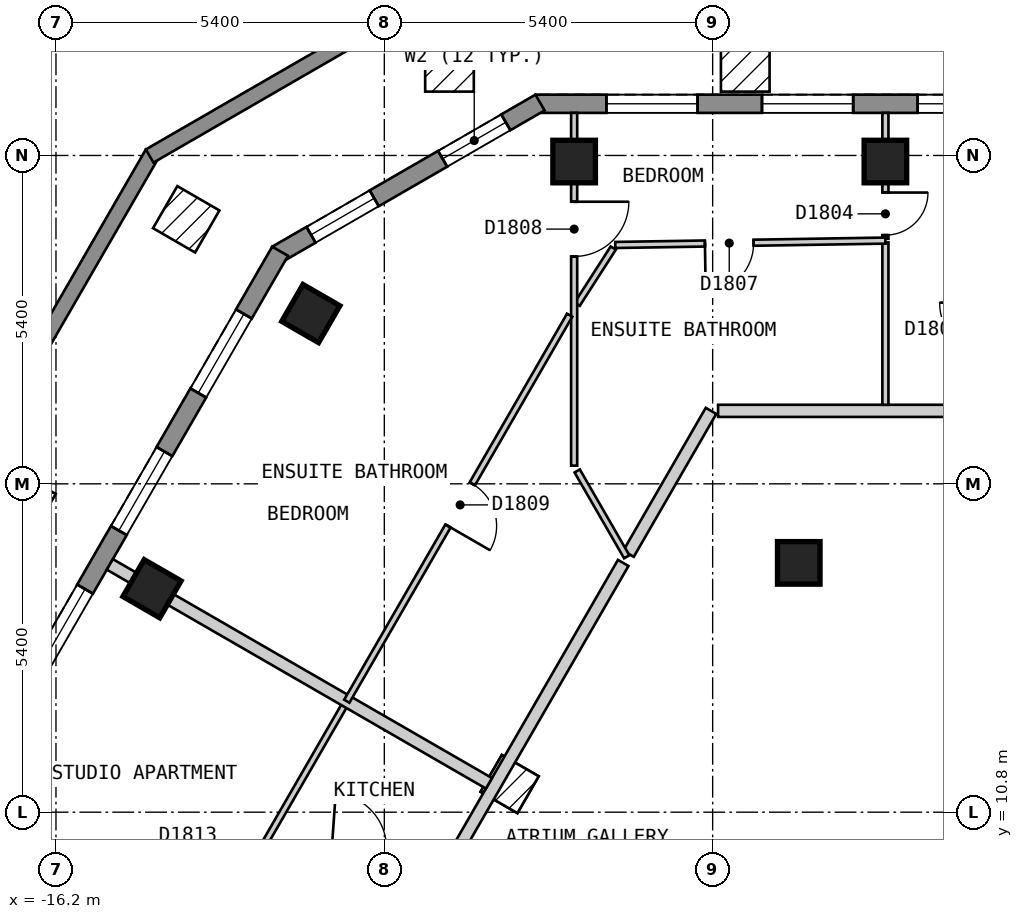
"""IFC4 building model, lengths in metres.
Left out: names, types, materials, properties, quantities, classifications, styles, units other than length and angle.
Written with IfcOpenShell. Run it as: python <this file> out.ifc"""

import sys

from ifc_helpers import new_model, si_unit, direction, frame, frame_2d, origin, origin_2d, place, context, subcontext, project, spatial, polyline, rectangle, outline, extrude, element, fill, save


model = new_model("IFC4")
c1 = context("Model", 3, precision=1e-05, world=origin(), true_north=direction((0.0, 1.0)))
c2 = subcontext(c1, "Body", "Model", "MODEL_VIEW")
j1 = project(units=[si_unit("LENGTHUNIT", "METRE"), si_unit("PLANEANGLEUNIT", "RADIAN")], contexts=[c1])
p1 = place(None, origin())
s1 = spatial("IfcSite", under=j1, at=p1, CompositionType="ELEMENT")
p2 = place(p1, origin())
s2 = spatial("IfcBuilding", under=s1, at=p2, CompositionType="ELEMENT")
p3 = place(p2, frame((0.0, 0.0, 202.8)))
s3 = spatial("IfcBuildingStorey", under=s2, at=p3, CompositionType="ELEMENT", Elevation=202.8)
for number, where, z_axis, x_axis in (
    (1, (-2.559, 21.5, 0.0), (0.0, 0.0, 1.0), (-1.0, 0.0, 0.0)),
    (2, (-7.678, 21.5, 0.0), (0.0, 0.0, 1.0), (-1.0, 0.0, 0.0)),
    (3, (-12.009, 19.0, 0.0), (0.0, 0.0, 1.0), (-0.5, -0.866, 0.0)),
    (4, (-14.621, 14.475, 0.0), (0.0, 0.0, 1.0), (-0.5, -0.866, 0.0)),
    (5, (-3.984, 14.9, 0.0), (0.0, 0.0, 1.0), (1.0, 0.0, 0.0)),
):
    element("IfcColumn", number, at=place(p3, frame(where, z_axis=z_axis, x_axis=x_axis)), inside=s3, PredefinedType="COLUMN", context=c2, shape_type="SweptSolid", body=[
        extrude(rectangle(XDim=0.7, YDim=0.7, at=origin_2d()), origin(), (0.0, 0.0, 1.0), 3.0),
    ])
p4 = place(p3, frame((8.314, 22.45, 0.0), z_axis=(0.0, 0.0, 1.0), x_axis=(-1.0, 0.0, 0.0)))
e6 = element("IfcWall", 6, at=p4, inside=s3, PredefinedType="SOLIDWALL", context=c2, shape_type="SweptSolid", body=[
    extrude(outline(polyline([(0.0, -0.15), (16.628, -0.15), (16.548, 0.15), (0.08, 0.15), (0.0, -0.15)])), origin(), (0.0, 0.0, 1.0), 2.7),
])
p5 = place(p4, frame((1.165, 0.0, 0.15)))
e7 = element("IfcOpeningElement", 7, at=p5, cuts=e6, PredefinedType="OPENING", context=c2, shape_type="SweptSolid", body=[
    extrude(rectangle(XDim=1.5, YDim=2.1, at=frame_2d((0.75, 1.05))), frame((0.0, 0.16, 0.0), z_axis=(0.0, -1.0, 0.0), x_axis=(1.0, 0.0, 0.0)), (0.0, 0.0, 1.0), 0.32),
])
p6 = place(p4, frame((3.724, 0.0, 0.15)))
e8 = element("IfcOpeningElement", 8, at=p6, cuts=e6, PredefinedType="OPENING", context=c2, shape_type="SweptSolid", body=[
    extrude(rectangle(XDim=1.5, YDim=2.1, at=frame_2d((0.75, 1.05))), frame((0.0, 0.16, 0.0), z_axis=(0.0, -1.0, 0.0), x_axis=(1.0, 0.0, 0.0)), (0.0, 0.0, 1.0), 0.32),
])
p7 = place(p4, frame((6.284, 0.0, 0.15)))
e9 = element("IfcOpeningElement", 9, at=p7, cuts=e6, PredefinedType="OPENING", context=c2, shape_type="SweptSolid", body=[
    extrude(rectangle(XDim=1.5, YDim=2.1, at=frame_2d((0.75, 1.05))), frame((0.0, 0.16, 0.0), z_axis=(0.0, -1.0, 0.0), x_axis=(1.0, 0.0, 0.0)), (0.0, 0.0, 1.0), 0.32),
])
p8 = place(p4, frame((8.843, 0.0, 0.15)))
e10 = element("IfcOpeningElement", 10, at=p8, cuts=e6, PredefinedType="OPENING", context=c2, shape_type="SweptSolid", body=[
    extrude(rectangle(XDim=1.5, YDim=2.1, at=frame_2d((0.75, 1.05))), frame((0.0, 0.16, 0.0), z_axis=(0.0, -1.0, 0.0), x_axis=(1.0, 0.0, 0.0)), (0.0, 0.0, 1.0), 0.32),
])
p9 = place(p4, frame((11.403, 0.0, 0.15)))
e11 = element("IfcOpeningElement", 11, at=p9, cuts=e6, PredefinedType="OPENING", context=c2, shape_type="SweptSolid", body=[
    extrude(rectangle(XDim=1.5, YDim=2.1, at=frame_2d((0.75, 1.05))), frame((0.0, 0.16, 0.0), z_axis=(0.0, -1.0, 0.0), x_axis=(1.0, 0.0, 0.0)), (0.0, 0.0, 1.0), 0.32),
])
p10 = place(p4, frame((13.962, 0.0, 0.15)))
e12 = element("IfcOpeningElement", 12, at=p10, cuts=e6, PredefinedType="OPENING", context=c2, shape_type="SweptSolid", body=[
    extrude(rectangle(XDim=1.5, YDim=2.1, at=frame_2d((0.75, 1.05))), frame((0.0, 0.16, 0.0), z_axis=(0.0, -1.0, 0.0), x_axis=(1.0, 0.0, 0.0)), (0.0, 0.0, 1.0), 0.32),
])
p11 = place(p3, frame((-8.239, 22.47, 0.0), z_axis=(0.0, 0.0, 1.0), x_axis=(-0.866022959057, -0.500004234368, 0.0)))
e13 = element("IfcWall", 13, at=p11, inside=s3, PredefinedType="SOLIDWALL", context=c2, shape_type="SweptSolid", body=[
    extrude(outline(polyline([(0.0, -0.15), (5.0, -0.15), (4.92, 0.15), (0.08, 0.15), (0.0, -0.15)])), origin(), (0.0, 0.0, 1.0), 2.7),
])
p12 = place(p11, frame((0.65, 0.0, 0.15)))
e14 = element("IfcOpeningElement", 14, at=p12, cuts=e13, PredefinedType="OPENING", context=c2, shape_type="SweptSolid", body=[
    extrude(rectangle(XDim=1.2, YDim=2.1, at=frame_2d((0.6, 1.05))), frame((0.0, 0.16, 0.0), z_axis=(0.0, -1.0, 0.0), x_axis=(1.0, 0.0, 0.0)), (0.0, 0.0, 1.0), 0.32),
])
p13 = place(p11, frame((3.149, 0.0, 0.15)))
e15 = element("IfcOpeningElement", 15, at=p13, cuts=e13, PredefinedType="OPENING", context=c2, shape_type="SweptSolid", body=[
    extrude(rectangle(XDim=1.2, YDim=2.1, at=frame_2d((0.6, 1.05))), frame((0.0, 0.16, 0.0), z_axis=(0.0, -1.0, 0.0), x_axis=(1.0, 0.0, 0.0)), (0.0, 0.0, 1.0), 0.32),
])
p14 = place(p3, frame((-12.514, 20.025, 0.0), z_axis=(0.0, 0.0, 1.0), x_axis=(-0.500003656944, -0.866023292436, 0.0)))
e16 = element("IfcWall", 16, at=p14, inside=s3, PredefinedType="SOLIDWALL", context=c2, shape_type="SweptSolid", body=[
    extrude(outline(polyline([(0.0, -0.15), (22.17, -0.15), (22.09, 0.15), (0.08, 0.15), (0.0, -0.15)])), origin(), (0.0, 0.0, 1.0), 2.7),
])
p15 = place(p14, frame((1.191, 0.0, 0.15)))
e17 = element("IfcOpeningElement", 17, at=p15, cuts=e16, PredefinedType="OPENING", context=c2, shape_type="SweptSolid", body=[
    extrude(rectangle(XDim=1.5, YDim=2.1, at=frame_2d((0.75, 1.05))), frame((0.0, 0.16, 0.0), z_axis=(0.0, -1.0, 0.0), x_axis=(1.0, 0.0, 0.0)), (0.0, 0.0, 1.0), 0.32),
])
p16 = place(p14, frame((3.804, 0.0, 0.15)))
e18 = element("IfcOpeningElement", 18, at=p16, cuts=e16, PredefinedType="OPENING", context=c2, shape_type="SweptSolid", body=[
    extrude(rectangle(XDim=1.5, YDim=2.1, at=frame_2d((0.75, 1.05))), frame((0.0, 0.16, 0.0), z_axis=(0.0, -1.0, 0.0), x_axis=(1.0, 0.0, 0.0)), (0.0, 0.0, 1.0), 0.32),
])
p17 = place(p14, frame((6.416, 0.0, 0.15)))
e19 = element("IfcOpeningElement", 19, at=p17, cuts=e16, PredefinedType="OPENING", context=c2, shape_type="SweptSolid", body=[
    extrude(rectangle(XDim=1.5, YDim=2.1, at=frame_2d((0.75, 1.05))), frame((0.0, 0.16, 0.0), z_axis=(0.0, -1.0, 0.0), x_axis=(1.0, 0.0, 0.0)), (0.0, 0.0, 1.0), 0.32),
])
p18 = place(p14, frame((9.029, 0.0, 0.15)))
e20 = element("IfcOpeningElement", 20, at=p18, cuts=e16, PredefinedType="OPENING", context=c2, shape_type="SweptSolid", body=[
    extrude(rectangle(XDim=1.5, YDim=2.1, at=frame_2d((0.75, 1.05))), frame((0.0, 0.16, 0.0), z_axis=(0.0, -1.0, 0.0), x_axis=(1.0, 0.0, 0.0)), (0.0, 0.0, 1.0), 0.32),
])
p19 = place(p14, frame((11.641, 0.0, 0.15)))
e21 = element("IfcOpeningElement", 21, at=p19, cuts=e16, PredefinedType="OPENING", context=c2, shape_type="SweptSolid", body=[
    extrude(rectangle(XDim=1.5, YDim=2.1, at=frame_2d((0.75, 1.05))), frame((0.0, 0.16, 0.0), z_axis=(0.0, -1.0, 0.0), x_axis=(1.0, 0.0, 0.0)), (0.0, 0.0, 1.0), 0.32),
])
p20 = place(p14, frame((14.254, 0.0, 0.15)))
e22 = element("IfcOpeningElement", 22, at=p20, cuts=e16, PredefinedType="OPENING", context=c2, shape_type="SweptSolid", body=[
    extrude(rectangle(XDim=1.5, YDim=2.1, at=frame_2d((0.75, 1.05))), frame((0.0, 0.16, 0.0), z_axis=(0.0, -1.0, 0.0), x_axis=(1.0, 0.0, 0.0)), (0.0, 0.0, 1.0), 0.32),
])
p21 = place(p14, frame((16.866, 0.0, 0.15)))
e23 = element("IfcOpeningElement", 23, at=p21, cuts=e16, PredefinedType="OPENING", context=c2, shape_type="SweptSolid", body=[
    extrude(rectangle(XDim=1.5, YDim=2.1, at=frame_2d((0.75, 1.05))), frame((0.0, 0.16, 0.0), z_axis=(0.0, -1.0, 0.0), x_axis=(1.0, 0.0, 0.0)), (0.0, 0.0, 1.0), 0.32),
])
p22 = place(p14, frame((19.479, 0.0, 0.15)))
e24 = element("IfcOpeningElement", 24, at=p22, cuts=e16, PredefinedType="OPENING", context=c2, shape_type="SweptSolid", body=[
    extrude(rectangle(XDim=1.5, YDim=2.1, at=frame_2d((0.75, 1.05))), frame((0.0, 0.16, 0.0), z_axis=(0.0, -1.0, 0.0), x_axis=(1.0, 0.0, 0.0)), (0.0, 0.0, 1.0), 0.32),
])
p23 = place(p3, frame((-26.046, 1.838, 0.0), z_axis=(0.0, 0.0, 1.0), x_axis=(0.500061067893, 0.865990143349, 0.0)))
e25 = element("IfcWall", 25, at=p23, inside=s3, PredefinedType="PARAPET", context=c2, shape_type="SweptSolid", body=[
    extrude(outline(polyline([(0.067, -0.125), (22.796, -0.125), (22.863, 0.125), (0.0, 0.125), (0.067, -0.125)])), origin(), (0.0, 0.0, 1.0), 1.6),
])
p24 = place(p3, frame((-14.659, 21.591, 0.0), z_axis=(0.0, 0.0, 1.0), x_axis=(0.865877295069, 0.50025644412, 0.0)))
e26 = element("IfcWall", 26, at=p24, inside=s3, PredefinedType="PARAPET", context=c2, shape_type="SweptSolid", body=[
    extrude(outline(polyline([(0.067, -0.125), (4.932, -0.125), (4.999, 0.125), (0.0, 0.125), (0.067, -0.125)])), origin(), (0.0, 0.0, 1.0), 1.6),
])
p25 = place(p3, frame((-5.311, 17.4, 0.0), z_axis=(0.0, 0.0, 1.0), x_axis=(1.0, 0.0, 0.0)))
e27 = element("IfcWall", 27, at=p25, inside=s3, PredefinedType="PARTITIONING", context=c2, shape_type="SweptSolid", body=[
    extrude(rectangle(XDim=10.737, YDim=0.2, at=frame_2d((5.369, 0.0))), origin(), (0.0, 0.0, 1.0), 2.7),
])
p26 = place(p25, frame((4.812, 0.0, 0.0)))
e28 = element("IfcOpeningElement", 28, at=p26, cuts=e27, PredefinedType="OPENING", context=c2, shape_type="SweptSolid", body=[
    extrude(rectangle(XDim=1.0, YDim=2.1, at=frame_2d((0.5, 1.05))), frame((0.0, 0.11, 0.0), z_axis=(0.0, -1.0, 0.0), x_axis=(1.0, 0.0, 0.0)), (0.0, 0.0, 1.0), 0.22),
])
p27 = place(p3, frame((-10.826, 8.048, 0.0), z_axis=(0.0, 0.0, 1.0), x_axis=(0.499953104851, 0.866052477019, 0.0)))
e29 = element("IfcWall", 29, at=p27, inside=s3, PredefinedType="PARTITIONING", context=c2, shape_type="SweptSolid", body=[
    extrude(rectangle(XDim=7.91, YDim=0.2, at=frame_2d((3.955, 0.0))), origin(), (0.0, 0.0, 1.0), 2.7),
])
p28 = place(p27, frame((0.603, 0.0, 0.0)))
e30 = element("IfcOpeningElement", 30, at=p28, cuts=e29, PredefinedType="OPENING", context=c2, shape_type="SweptSolid", body=[
    extrude(rectangle(XDim=1.0, YDim=2.1, at=frame_2d((0.5, 1.05))), frame((0.0, 0.11, 0.0), z_axis=(0.0, -1.0, 0.0), x_axis=(1.0, 0.0, 0.0)), (0.0, 0.0, 1.0), 0.22),
])
p29 = place(p3, frame((-6.784, 15.05, 0.0), z_axis=(0.0, 0.0, 1.0), x_axis=(0.500067724834, 0.865986299303, 0.0)))
e31 = element("IfcWall", 31, at=p29, inside=s3, PredefinedType="PARTITIONING", context=c2, shape_type="SweptSolid", body=[
    extrude(rectangle(XDim=2.713, YDim=0.2, at=frame_2d((1.357, 0.0))), origin(), (0.0, 0.0, 1.0), 2.7),
])
p30 = place(p3, frame((-7.628, 16.412, 0.0), z_axis=(0.0, 0.0, 1.0), x_axis=(0.499843439945, -0.866115774908, 0.0)))
e32 = element("IfcWall", 32, at=p30, inside=s3, PredefinedType="PARTITIONING", context=c2, shape_type="SweptSolid", body=[
    extrude(rectangle(XDim=1.63, YDim=0.1, at=frame_2d((0.815, 0.0))), origin(), (0.0, 0.0, 1.0), 2.7),
])
p31 = place(p3, frame((-2.559, 20.17, 0.0), z_axis=(0.0, 0.0, 1.0), x_axis=(0.0, -1.0, 0.0)))
e33 = element("IfcWall", 33, at=p31, inside=s3, PredefinedType="PARTITIONING", context=c2, shape_type="SweptSolid", body=[
    extrude(rectangle(XDim=2.67, YDim=0.1, at=frame_2d((1.335, 0.0))), origin(), (0.0, 0.0, 1.0), 2.7),
])
p32 = place(p3, frame((-7.628, 19.154, 0.0), z_axis=(0.0, 0.0, 1.0), x_axis=(0.540600102017, 0.841279697663, 0.0)))
e34 = element("IfcWall", 34, at=p32, inside=s3, PredefinedType="PARTITIONING", context=c2, shape_type="SweptSolid", body=[
    extrude(rectangle(XDim=1.097, YDim=0.1, at=frame_2d((0.548, 0.0))), origin(), (0.0, 0.0, 1.0), 2.7),
])
p33 = place(p3, frame((-12.778, 10.268, 0.0), z_axis=(0.0, 0.0, 1.0), x_axis=(0.500084799062, 0.865976439487, 0.0)))
e35 = element("IfcWall", 35, at=p33, inside=s3, PredefinedType="PARTITIONING", context=c2, shape_type="SweptSolid", body=[
    extrude(rectangle(XDim=2.722, YDim=0.1, at=frame_2d((1.361, 0.0))), origin(), (0.0, 0.0, 1.0), 2.7),
])
p34 = place(p3, frame((-7.678, 16.499, 0.0), z_axis=(0.0, 0.0, 1.0), x_axis=(0.0, 1.0, 0.0)))
e36 = element("IfcWall", 36, at=p34, inside=s3, PredefinedType="PARTITIONING", context=c2, shape_type="SweptSolid", body=[
    extrude(rectangle(XDim=5.801, YDim=0.1, at=frame_2d((2.9, 0.0))), origin(), (0.0, 0.0, 1.0), 2.7),
])
p35 = place(p34, frame((3.44, 0.0, 0.0)))
e37 = element("IfcOpeningElement", 37, at=p35, cuts=e36, PredefinedType="OPENING", context=c2, shape_type="SweptSolid", body=[
    extrude(rectangle(XDim=0.9, YDim=2.1, at=frame_2d((0.45, 1.05))), frame((0.0, 0.06, 0.0), z_axis=(0.0, -1.0, 0.0), x_axis=(1.0, 0.0, 0.0)), (0.0, 0.0, 1.0), 0.12),
])
p36 = place(p3, frame((-2.559, 20.23, 0.0), z_axis=(0.0, 0.0, 1.0), x_axis=(0.0, 1.0, 0.0)))
e38 = element("IfcWall", 38, at=p36, inside=s3, PredefinedType="PARTITIONING", context=c2, shape_type="SweptSolid", body=[
    extrude(rectangle(XDim=2.07, YDim=0.1, at=frame_2d((1.035, 0.0))), origin(), (0.0, 0.0, 1.0), 2.7),
])
p37 = place(p36, frame((0.06, 0.0, 0.0)))
e39 = element("IfcOpeningElement", 39, at=p37, cuts=e38, PredefinedType="OPENING", context=c2, shape_type="SweptSolid", body=[
    extrude(rectangle(XDim=0.7, YDim=2.1, at=frame_2d((0.35, 1.05))), frame((0.0, 0.06, 0.0), z_axis=(0.0, -1.0, 0.0), x_axis=(1.0, 0.0, 0.0)), (0.0, 0.0, 1.0), 0.12),
])
p38 = place(p3, frame((-7.002, 20.128, 0.0), z_axis=(0.0, 0.0, 1.0), x_axis=(0.999868634558, 0.016208443081, 0.0)))
e40 = element("IfcWall", 40, at=p38, inside=s3, PredefinedType="PARTITIONING", context=c2, shape_type="SweptSolid", body=[
    extrude(rectangle(XDim=4.443, YDim=0.1, at=frame_2d((2.222, 0.0))), origin(), (0.0, 0.0, 1.0), 2.7),
])
p39 = place(p38, frame((1.475, 0.0, 0.0)))
e41 = element("IfcOpeningElement", 41, at=p39, cuts=e40, PredefinedType="OPENING", context=c2, shape_type="SweptSolid", body=[
    extrude(rectangle(XDim=0.8, YDim=2.1, at=frame_2d((0.4, 1.05))), frame((0.0, 0.06, 0.0), z_axis=(0.0, -1.0, 0.0), x_axis=(1.0, 0.0, 0.0)), (0.0, 0.0, 1.0), 0.12),
])
p40 = place(p3, frame((-17.926, 10.35, 0.0), z_axis=(0.0, 0.0, 1.0), x_axis=(0.866018411306, -0.500012111133, 0.0)))
e42 = element("IfcWall", 42, at=p40, inside=s3, PredefinedType="PARTITIONING", context=c2, shape_type="SweptSolid", body=[
    extrude(rectangle(XDim=9.898, YDim=0.2, at=frame_2d((4.949, 0.0))), origin(), (0.0, 0.0, 1.0), 2.7),
])
p41 = place(p3, frame((-15.314, 14.875, 0.0), z_axis=(0.0, 0.0, 1.0), x_axis=(0.866001485781, -0.500041424909, 0.0)))
e43 = element("IfcWall", 43, at=p41, inside=s3, PredefinedType="PARTITIONING", context=c2, shape_type="SweptSolid", body=[
    extrude(rectangle(XDim=7.2, YDim=0.2, at=frame_2d((3.6, 0.0))), origin(), (0.0, 0.0, 1.0), 2.7),
])
p42 = place(p3, frame((-11.417, 12.625, 0.0), z_axis=(0.0, 0.0, 1.0), x_axis=(0.500007885066, 0.866020851292, 0.0)))
e44 = element("IfcWall", 44, at=p42, inside=s3, PredefinedType="PARTITIONING", context=c2, shape_type="SweptSolid", body=[
    extrude(rectangle(XDim=7.33, YDim=0.1, at=frame_2d((3.665, 0.0))), origin(), (0.0, 0.0, 1.0), 2.7),
])
p43 = place(p42, frame((3.328, 0.0, 0.0)))
e45 = element("IfcOpeningElement", 45, at=p43, cuts=e44, PredefinedType="OPENING", context=c2, shape_type="SweptSolid", body=[
    extrude(rectangle(XDim=0.8, YDim=2.1, at=frame_2d((0.4, 1.05))), frame((0.0, 0.06, 0.0), z_axis=(0.0, -1.0, 0.0), x_axis=(1.0, 0.0, 0.0)), (0.0, 0.0, 1.0), 0.12),
])
p44 = place(p8, origin())
e46 = element("IfcWindow", 46, at=p44, inside=s3, PartitioningType="SINGLE_PANEL", PredefinedType="WINDOW", context=c2, shape_type="SweptSolid", body=[
    extrude(rectangle(XDim=1.5, YDim=2.1, at=frame_2d((0.75, 1.05))), frame((0.0, 0.03, 0.0), z_axis=(0.0, -1.0, 0.0), x_axis=(1.0, 0.0, 0.0)), (0.0, 0.0, 1.0), 0.06),
])
fill(e10, e46)
p45 = place(p9, origin())
e47 = element("IfcWindow", 47, at=p45, inside=s3, PartitioningType="SINGLE_PANEL", PredefinedType="WINDOW", context=c2, shape_type="SweptSolid", body=[
    extrude(rectangle(XDim=1.5, YDim=2.1, at=frame_2d((0.75, 1.05))), frame((0.0, 0.03, 0.0), z_axis=(0.0, -1.0, 0.0), x_axis=(1.0, 0.0, 0.0)), (0.0, 0.0, 1.0), 0.06),
])
fill(e11, e47)
p46 = place(p10, origin())
e48 = element("IfcWindow", 48, at=p46, inside=s3, PartitioningType="SINGLE_PANEL", PredefinedType="WINDOW", context=c2, shape_type="SweptSolid", body=[
    extrude(rectangle(XDim=1.5, YDim=2.1, at=frame_2d((0.75, 1.05))), frame((0.0, 0.03, 0.0), z_axis=(0.0, -1.0, 0.0), x_axis=(1.0, 0.0, 0.0)), (0.0, 0.0, 1.0), 0.06),
])
fill(e12, e48)
p47 = place(p12, origin())
e49 = element("IfcWindow", 49, at=p47, inside=s3, PartitioningType="SINGLE_PANEL", PredefinedType="WINDOW", context=c2, shape_type="SweptSolid", body=[
    extrude(rectangle(XDim=1.2, YDim=2.1, at=frame_2d((0.6, 1.05))), frame((0.0, 0.03, 0.0), z_axis=(0.0, -1.0, 0.0), x_axis=(1.0, 0.0, 0.0)), (0.0, 0.0, 1.0), 0.06),
])
fill(e14, e49)
p48 = place(p13, origin())
e50 = element("IfcWindow", 50, at=p48, inside=s3, PartitioningType="SINGLE_PANEL", PredefinedType="WINDOW", context=c2, shape_type="SweptSolid", body=[
    extrude(rectangle(XDim=1.2, YDim=2.1, at=frame_2d((0.6, 1.05))), frame((0.0, 0.03, 0.0), z_axis=(0.0, -1.0, 0.0), x_axis=(1.0, 0.0, 0.0)), (0.0, 0.0, 1.0), 0.06),
])
fill(e15, e50)
p49 = place(p15, origin())
e51 = element("IfcWindow", 51, at=p49, inside=s3, PartitioningType="SINGLE_PANEL", PredefinedType="WINDOW", context=c2, shape_type="SweptSolid", body=[
    extrude(rectangle(XDim=1.5, YDim=2.1, at=frame_2d((0.75, 1.05))), frame((0.0, 0.03, 0.0), z_axis=(0.0, -1.0, 0.0), x_axis=(1.0, 0.0, 0.0)), (0.0, 0.0, 1.0), 0.06),
])
fill(e17, e51)
p50 = place(p16, origin())
e52 = element("IfcWindow", 52, at=p50, inside=s3, PartitioningType="SINGLE_PANEL", PredefinedType="WINDOW", context=c2, shape_type="SweptSolid", body=[
    extrude(rectangle(XDim=1.5, YDim=2.1, at=frame_2d((0.75, 1.05))), frame((0.0, 0.03, 0.0), z_axis=(0.0, -1.0, 0.0), x_axis=(1.0, 0.0, 0.0)), (0.0, 0.0, 1.0), 0.06),
])
fill(e18, e52)
p51 = place(p17, origin())
e53 = element("IfcWindow", 53, at=p51, inside=s3, PartitioningType="SINGLE_PANEL", PredefinedType="WINDOW", context=c2, shape_type="SweptSolid", body=[
    extrude(rectangle(XDim=1.5, YDim=2.1, at=frame_2d((0.75, 1.05))), frame((0.0, 0.03, 0.0), z_axis=(0.0, -1.0, 0.0), x_axis=(1.0, 0.0, 0.0)), (0.0, 0.0, 1.0), 0.06),
])
fill(e19, e53)
p52 = place(p37, origin())
e54 = element("IfcDoor", 54, at=p52, inside=s3, OperationType="SINGLE_SWING_RIGHT", PredefinedType="DOOR", context=c2, shape_type="SweptSolid", body=[
    extrude(rectangle(XDim=0.7, YDim=2.1, at=frame_2d((0.35, 1.05))), frame((0.0, 0.025, 0.0), z_axis=(0.0, -1.0, 0.0), x_axis=(1.0, 0.0, 0.0)), (0.0, 0.0, 1.0), 0.05),
])
fill(e39, e54)
p53 = place(p39, origin())
e55 = element("IfcDoor", 55, at=p53, inside=s3, OperationType="SINGLE_SWING_LEFT", PredefinedType="DOOR", context=c2, shape_type="SweptSolid", body=[
    extrude(rectangle(XDim=0.8, YDim=2.1, at=frame_2d((0.4, 1.05))), frame((0.0, 0.025, 0.0), z_axis=(0.0, -1.0, 0.0), x_axis=(1.0, 0.0, 0.0)), (0.0, 0.0, 1.0), 0.05),
])
fill(e41, e55)
p54 = place(p35, origin())
e56 = element("IfcDoor", 56, at=p54, inside=s3, OperationType="SINGLE_SWING_RIGHT", PredefinedType="DOOR", context=c2, shape_type="SweptSolid", body=[
    extrude(rectangle(XDim=0.9, YDim=2.1, at=frame_2d((0.45, 1.05))), frame((0.0, 0.025, 0.0), z_axis=(0.0, -1.0, 0.0), x_axis=(1.0, 0.0, 0.0)), (0.0, 0.0, 1.0), 0.05),
])
fill(e37, e56)
p55 = place(p43, origin())
e57 = element("IfcDoor", 57, at=p55, inside=s3, OperationType="SINGLE_SWING_LEFT", PredefinedType="DOOR", context=c2, shape_type="SweptSolid", body=[
    extrude(rectangle(XDim=0.8, YDim=2.1, at=frame_2d((0.4, 1.05))), frame((0.0, 0.025, 0.0), z_axis=(0.0, -1.0, 0.0), x_axis=(1.0, 0.0, 0.0)), (0.0, 0.0, 1.0), 0.05),
])
fill(e45, e57)
save(model, sys.argv[1])
